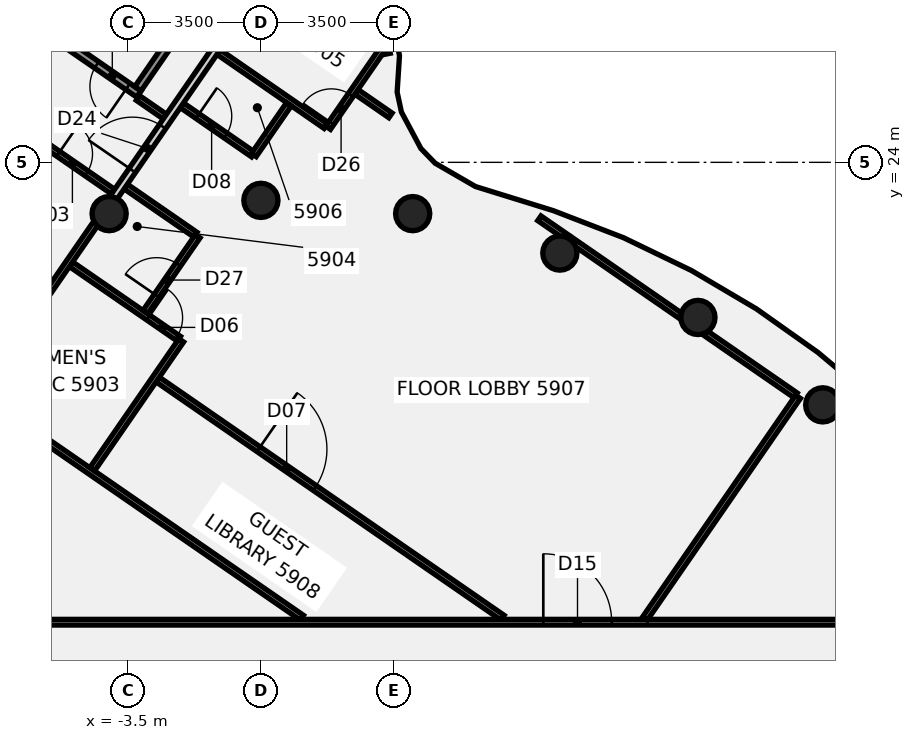
"""IFC4 building model, lengths in metres.
Left out: names, types, materials, properties, quantities, classifications, styles, units other than length and angle.
Written with IfcOpenShell. Run it as: python <this file> out.ifc"""

import sys

from ifc_helpers import new_model, si_unit, direction, frame, frame_2d, origin, origin_2d, place, context, subcontext, project, spatial, rectangle, circle, extrude, element, fill, save


model = new_model("IFC4")
c1 = context("Model", 3, precision=1e-05, world=origin(), true_north=direction((0.0, 1.0)))
c2 = subcontext(c1, "Body", "Model", "MODEL_VIEW")
j1 = project(units=[si_unit("LENGTHUNIT", "METRE"), si_unit("PLANEANGLEUNIT", "RADIAN")], contexts=[c1])
p1 = place(None, origin())
s1 = spatial("IfcSite", under=j1, at=p1, CompositionType="ELEMENT")
p2 = place(p1, origin())
s2 = spatial("IfcBuilding", under=s1, at=p2, CompositionType="ELEMENT")
p3 = place(p2, frame((0.0, 0.0, 234.3)))
s3 = spatial("IfcBuildingStorey", under=s2, at=p3, CompositionType="ELEMENT", Elevation=234.3)
for number, where, z_axis, x_axis in (
    (1, (14.784, 17.619, -0.14), (0.0, 0.0, 1.0), (1.0, 0.0, 0.0)),
    (2, (11.5, 19.919, -0.14), (0.0, 0.0, 1.0), (1.0, 0.0, 0.0)),
    (3, (7.866, 21.613, -0.14), (0.0, 0.0, 1.0), (1.0, 0.0, 0.0)),
    (4, (3.994, 22.651, -0.14), (0.0, 0.0, 1.0), (1.0, 0.0, 0.0)),
    (5, (0.0, 23.0, -0.14), (0.0, 0.0, 1.0), (1.0, 0.0, 0.0)),
    (6, (-3.994, 22.651, -0.14), (0.0, 0.0, 1.0), (1.0, 0.0, 0.0)),
):
    element("IfcColumn", number, at=place(p3, frame(where, z_axis=z_axis, x_axis=x_axis)), inside=s3, PredefinedType="COLUMN", context=c2, shape_type="SweptSolid", body=[
        extrude(circle(Radius=0.45, at=origin_2d()), origin(), (0.0, 0.0, 1.0), 3.6),
    ])
p4 = place(p3, frame((-13.505, 22.09, 0.0), z_axis=(0.0, 0.0, 1.0), x_axis=(0.822876963687, -0.568219590152, 0.0)))
e7 = element("IfcWall", 7, at=p4, inside=s3, PredefinedType="PARTITIONING", context=c2, shape_type="SweptSolid", body=[
    extrude(rectangle(XDim=17.723, YDim=0.15, at=frame_2d((8.861, 0.0))), origin(), (0.0, 0.0, 1.0), 2.864),
])
p5 = place(p3, frame((-11.149, 28.24, 0.0), z_axis=(0.0, 0.0, 1.0), x_axis=(0.822911999703, -0.568168848798, 0.0)))
e8 = element("IfcWall", 8, at=p5, inside=s3, PredefinedType="PARTITIONING", context=c2, shape_type="SweptSolid", body=[
    extrude(rectangle(XDim=8.82, YDim=0.15, at=frame_2d((4.41, 0.0))), origin(), (0.0, 0.0, 1.0), 2.864),
])
p6 = place(p5, frame((7.071, 0.0, 0.0)))
e9 = element("IfcOpeningElement", 9, at=p6, cuts=e8, PredefinedType="OPENING", context=c2, shape_type="SweptSolid", body=[
    extrude(rectangle(XDim=0.9, YDim=2.1, at=frame_2d((0.45, 1.05))), frame((0.0, 0.085, 0.0), z_axis=(0.0, -1.0, 0.0), x_axis=(1.0, 0.0, 0.0)), (0.0, 0.0, 1.0), 0.17),
])
p7 = place(p5, frame((0.52, 0.0, 0.0)))
e10 = element("IfcOpeningElement", 10, at=p7, cuts=e8, PredefinedType="OPENING", context=c2, shape_type="SweptSolid", body=[
    extrude(rectangle(XDim=0.9, YDim=2.1, at=frame_2d((0.45, 1.05))), frame((0.0, 0.085, 0.0), z_axis=(0.0, -1.0, 0.0), x_axis=(1.0, 0.0, 0.0)), (0.0, 0.0, 1.0), 0.17),
])
p8 = place(p3, frame((-3.235, 25.693, 0.0), z_axis=(0.0, 0.0, 1.0), x_axis=(0.822947443063, -0.568117510694, 0.0)))
e11 = element("IfcWall", 11, at=p8, inside=s3, PredefinedType="PARTITIONING", context=c2, shape_type="SweptSolid", body=[
    extrude(rectangle(XDim=0.86, YDim=0.15, at=frame_2d((0.43, 0.0))), origin(), (0.0, 0.0, 1.0), 2.864),
])
p9 = place(p3, frame((-4.993, 21.316, 0.0), z_axis=(0.0, 0.0, 1.0), x_axis=(0.823002595966, -0.568037610579, 0.0)))
e12 = element("IfcWall", 12, at=p9, inside=s3, PredefinedType="PARTITIONING", context=c2, shape_type="SweptSolid", body=[
    extrude(rectangle(XDim=3.445, YDim=0.15, at=frame_2d((1.723, 0.0))), origin(), (0.0, 0.0, 1.0), 2.864),
])
p10 = place(p9, frame((2.47, 0.0, 0.0)))
e13 = element("IfcOpeningElement", 13, at=p10, cuts=e12, PredefinedType="OPENING", context=c2, shape_type="SweptSolid", body=[
    extrude(rectangle(XDim=0.9, YDim=2.1, at=frame_2d((0.45, 1.05))), frame((0.0, 0.085, 0.0), z_axis=(0.0, -1.0, 0.0), x_axis=(1.0, 0.0, 0.0)), (0.0, 0.0, 1.0), 0.17),
])
p11 = place(p3, frame((-3.556, 23.362, 0.0), z_axis=(0.0, 0.0, 1.0), x_axis=(0.822823613498, -0.568296842389, 0.0)))
e14 = element("IfcWall", 14, at=p11, inside=s3, PredefinedType="PARTITIONING", context=c2, shape_type="SweptSolid", body=[
    extrude(rectangle(XDim=2.225, YDim=0.15, at=frame_2d((1.113, 0.0))), origin(), (0.0, 0.0, 1.0), 2.864),
])
p12 = place(p3, frame((-2.712, 18.282, 0.0), z_axis=(0.0, 0.0, 1.0), x_axis=(0.822882105938, -0.568212143242, 0.0)))
e15 = element("IfcWall", 15, at=p12, inside=s3, PredefinedType="PARTITIONING", context=c2, shape_type="SweptSolid", body=[
    extrude(rectangle(XDim=11.023, YDim=0.15, at=frame_2d((5.511, 0.0))), origin(), (0.0, 0.0, 1.0), 2.864),
])
p13 = place(p12, frame((3.22, 0.0, 0.0)))
e16 = element("IfcOpeningElement", 16, at=p13, cuts=e15, PredefinedType="OPENING", context=c2, shape_type="SweptSolid", body=[
    extrude(rectangle(XDim=1.8, YDim=2.1, at=frame_2d((0.9, 1.05))), frame((0.0, 0.085, 0.0), z_axis=(0.0, -1.0, 0.0), x_axis=(1.0, 0.0, 0.0)), (0.0, 0.0, 1.0), 0.17),
])
p14 = place(p3, frame((-2.079, 25.501, 0.0), z_axis=(0.0, 0.0, 1.0), x_axis=(0.822812265146, -0.568313273051, 0.0)))
e17 = element("IfcWall", 17, at=p14, inside=s3, PredefinedType="PARTITIONING", context=c2, shape_type="SweptSolid", body=[
    extrude(rectangle(XDim=2.28, YDim=0.15, at=frame_2d((1.14, 0.0))), origin(), (0.0, 0.0, 1.0), 2.864),
])
p15 = place(p14, frame((0.5, 0.0, 0.0)))
e18 = element("IfcOpeningElement", 18, at=p15, cuts=e17, PredefinedType="OPENING", context=c2, shape_type="SweptSolid", body=[
    extrude(rectangle(XDim=0.9, YDim=2.1, at=frame_2d((0.45, 1.05))), frame((0.0, 0.085, 0.0), z_axis=(0.0, -1.0, 0.0), x_axis=(1.0, 0.0, 0.0)), (0.0, 0.0, 1.0), 0.17),
])
p16 = place(p3, frame((-1.113, 26.9, 0.0), z_axis=(0.0, 0.0, 1.0), x_axis=(0.822835791023, -0.568279210434, 0.0)))
e19 = element("IfcWall", 19, at=p16, inside=s3, PredefinedType="PARTITIONING", context=c2, shape_type="SweptSolid", body=[
    extrude(rectangle(XDim=3.425, YDim=0.15, at=frame_2d((1.712, 0.0))), origin(), (0.0, 0.0, 1.0), 2.864),
])
p17 = place(p3, frame((2.515, 25.854, 0.0), z_axis=(0.0, 0.0, 1.0), x_axis=(0.82271698024, -0.568451203205, 0.0)))
e20 = element("IfcWall", 20, at=p17, inside=s3, PredefinedType="PARTITIONING", context=c2, shape_type="SweptSolid", body=[
    extrude(rectangle(XDim=1.088, YDim=0.15, at=frame_2d((0.544, 0.0))), origin(), (0.0, 0.0, 1.0), 2.864),
])
p18 = place(p3, frame((7.327, 22.528, 0.0), z_axis=(0.0, 0.0, 1.0), x_axis=(0.822772158808, -0.568371335211, 0.0)))
e21 = element("IfcWall", 21, at=p18, inside=s3, PredefinedType="PARTITIONING", context=c2, shape_type="SweptSolid", body=[
    extrude(rectangle(XDim=0.894, YDim=0.15, at=frame_2d((0.447, 0.0))), origin(), (0.0, 0.0, 1.0), 2.864),
])
p19 = place(p3, frame((8.143, 21.965, 0.0), z_axis=(0.0, 0.0, 1.0), x_axis=(0.822719175058, -0.56844802664, 0.0)))
e22 = element("IfcWall", 22, at=p19, inside=s3, PredefinedType="PARTITIONING", context=c2, shape_type="SweptSolid", body=[
    extrude(rectangle(XDim=3.533, YDim=0.15, at=frame_2d((1.767, 0.0))), origin(), (0.0, 0.0, 1.0), 2.864),
])
p20 = place(p3, frame((11.695, 19.511, 0.0), z_axis=(0.0, 0.0, 1.0), x_axis=(0.822712363529, -0.568457884893, 0.0)))
e23 = element("IfcWall", 23, at=p20, inside=s3, PredefinedType="PARTITIONING", context=c2, shape_type="SweptSolid", body=[
    extrude(rectangle(XDim=2.887, YDim=0.15, at=frame_2d((1.444, 0.0))), origin(), (0.0, 0.0, 1.0), 2.864),
])
p21 = place(p3, frame((-17.065, 11.9, 0.0), z_axis=(0.0, 0.0, 1.0), x_axis=(1.0, 0.0, 0.0)))
e24 = element("IfcWall", 24, at=p21, inside=s3, PredefinedType="PARTITIONING", context=c2, shape_type="SweptSolid", body=[
    extrude(rectangle(XDim=34.165, YDim=0.15, at=frame_2d((17.083, 0.0))), origin(), (0.0, 0.0, 1.0), 2.864),
])
p22 = place(p21, frame((24.496, 0.0, 0.0)))
e25 = element("IfcOpeningElement", 25, at=p22, cuts=e24, PredefinedType="OPENING", context=c2, shape_type="SweptSolid", body=[
    extrude(rectangle(XDim=1.8, YDim=2.1, at=frame_2d((0.9, 1.05))), frame((0.0, 0.085, 0.0), z_axis=(0.0, -1.0, 0.0), x_axis=(1.0, 0.0, 0.0)), (0.0, 0.0, 1.0), 0.17),
])
p23 = place(p21, frame((9.52, 0.0, 0.0)))
e26 = element("IfcOpeningElement", 26, at=p23, cuts=e24, PredefinedType="OPENING", context=c2, shape_type="SweptSolid", body=[
    extrude(rectangle(XDim=1.8, YDim=2.1, at=frame_2d((0.9, 1.05))), frame((0.0, 0.085, 0.0), z_axis=(0.0, -1.0, 0.0), x_axis=(1.0, 0.0, 0.0)), (0.0, 0.0, 1.0), 0.17),
])
p24 = place(p21, frame((2.62, 0.0, 0.0)))
e27 = element("IfcOpeningElement", 27, at=p24, cuts=e24, PredefinedType="OPENING", context=c2, shape_type="SweptSolid", body=[
    extrude(rectangle(XDim=1.8, YDim=2.1, at=frame_2d((0.9, 1.05))), frame((0.0, 0.085, 0.0), z_axis=(0.0, -1.0, 0.0), x_axis=(1.0, 0.0, 0.0)), (0.0, 0.0, 1.0), 0.17),
])
p25 = place(p3, frame((-7.399, 17.971, 0.0), z_axis=(0.0, 0.0, 1.0), x_axis=(0.568117777374, 0.822947258961, 0.0)))
e28 = element("IfcWall", 28, at=p25, inside=s3, PredefinedType="PARTITIONING", context=c2, shape_type="SweptSolid", body=[
    extrude(rectangle(XDim=5.559, YDim=0.15, at=frame_2d((2.779, 0.0))), origin(), (0.0, 0.0, 1.0), 2.864),
])
p26 = place(p3, frame((-3.986, 22.915, 0.0), z_axis=(0.0, 0.0, 1.0), x_axis=(0.568137981327, 0.822933310891, 0.0)))
e29 = element("IfcWall", 29, at=p26, inside=s3, PredefinedType="PARTITIONING", context=c2, shape_type="SweptSolid", body=[
    extrude(rectangle(XDim=8.211, YDim=0.2, at=frame_2d((4.105, 0.0))), origin(), (0.0, 0.0, 1.0), 2.864),
])
p27 = place(p26, frame((1.062, 0.0, 0.0)))
e30 = element("IfcOpeningElement", 30, at=p27, cuts=e29, PredefinedType="OPENING", context=c2, shape_type="SweptSolid", body=[
    extrude(rectangle(XDim=1.4, YDim=2.1, at=frame_2d((0.7, 1.05))), frame((0.0, 0.11, 0.0), z_axis=(0.0, -1.0, 0.0), x_axis=(1.0, 0.0, 0.0)), (0.0, 0.0, 1.0), 0.22),
])
p28 = place(p3, frame((-4.438, 15.926, 0.0), z_axis=(0.0, 0.0, 1.0), x_axis=(0.568380820639, 0.82276560619, 0.0)))
e31 = element("IfcWall", 31, at=p28, inside=s3, PredefinedType="PARTITIONING", context=c2, shape_type="SweptSolid", body=[
    extrude(rectangle(XDim=4.12, YDim=0.15, at=frame_2d((2.06, 0.0))), origin(), (0.0, 0.0, 1.0), 2.864),
])
p29 = place(p3, frame((1.769, 24.91, 0.0), z_axis=(0.0, 0.0, 1.0), x_axis=(0.568435463035, 0.82272785559, 0.0)))
e32 = element("IfcWall", 32, at=p29, inside=s3, PredefinedType="PARTITIONING", context=c2, shape_type="SweptSolid", body=[
    extrude(rectangle(XDim=2.509, YDim=0.15, at=frame_2d((1.254, 0.0))), origin(), (0.0, 0.0, 1.0), 2.864),
])
p30 = place(p29, frame((0.15, 0.0, 0.0)))
e33 = element("IfcOpeningElement", 33, at=p30, cuts=e32, PredefinedType="OPENING", context=c2, shape_type="SweptSolid", body=[
    extrude(rectangle(XDim=0.9, YDim=2.1, at=frame_2d((0.45, 1.05))), frame((0.0, 0.085, 0.0), z_axis=(0.0, -1.0, 0.0), x_axis=(1.0, 0.0, 0.0)), (0.0, 0.0, 1.0), 0.17),
])
p31 = place(p3, frame((-3.039, 20.064, 0.0), z_axis=(0.0, 0.0, 1.0), x_axis=(0.568359858761, 0.822780086627, 0.0)))
e34 = element("IfcWall", 34, at=p31, inside=s3, PredefinedType="PARTITIONING", context=c2, shape_type="SweptSolid", body=[
    extrude(rectangle(XDim=2.42, YDim=0.15, at=frame_2d((1.21, 0.0))), origin(), (0.0, 0.0, 1.0), 2.864),
])
p32 = place(p31, frame((0.52, 0.0, 0.0)))
e35 = element("IfcOpeningElement", 35, at=p32, cuts=e34, PredefinedType="OPENING", context=c2, shape_type="SweptSolid", body=[
    extrude(rectangle(XDim=1.0, YDim=2.1, at=frame_2d((0.5, 1.05))), frame((0.0, 0.085, 0.0), z_axis=(0.0, -1.0, 0.0), x_axis=(1.0, 0.0, 0.0)), (0.0, 0.0, 1.0), 0.17),
])
p33 = place(p3, frame((-0.186, 24.194, 0.0), z_axis=(0.0, 0.0, 1.0), x_axis=(0.568394779045, 0.822755963305, 0.0)))
e36 = element("IfcWall", 36, at=p33, inside=s3, PredefinedType="PARTITIONING", context=c2, shape_type="SweptSolid", body=[
    extrude(rectangle(XDim=1.62, YDim=0.15, at=frame_2d((0.81, 0.0))), origin(), (0.0, 0.0, 1.0), 2.864),
])
p34 = place(p3, frame((10.107, 11.999, 0.0), z_axis=(0.0, 0.0, 1.0), x_axis=(0.568236818538, 0.822865066738, 0.0)))
e37 = element("IfcWall", 37, at=p34, inside=s3, PredefinedType="PARTITIONING", context=c2, shape_type="SweptSolid", body=[
    extrude(rectangle(XDim=7.087, YDim=0.15, at=frame_2d((3.543, 0.0))), origin(), (0.0, 0.0, 1.0), 2.864),
])
p35 = place(p3, frame((3.331, 26.856, 0.0), z_axis=(0.0, 0.0, 1.0), x_axis=(-0.191418572588, 0.981508497196, 0.0)))
e38 = element("IfcWall", 38, at=p35, inside=s3, PredefinedType="PARTITIONING", context=c2, shape_type="SweptSolid", body=[
    extrude(rectangle(XDim=0.5, YDim=0.15, at=frame_2d((0.25, 0.0))), origin(), (0.0, 0.0, 1.0), 2.864),
])
p36 = place(p3, frame((-3.211, 25.797, -0.14), z_axis=(0.0, 0.0, 1.0), x_axis=(-0.822880268837, 0.568214803713, 0.0)))
e39 = element("IfcWall", 39, at=p36, inside=s3, PredefinedType="SHEAR", context=c2, shape_type="SweptSolid", body=[
    extrude(rectangle(XDim=6.7, YDim=0.2, at=frame_2d((3.35, 0.0))), origin(), (0.0, 0.0, 1.0), 3.004),
])
p37 = place(p36, frame((0.35, 0.0, 0.0)))
e40 = element("IfcOpeningElement", 40, at=p37, cuts=e39, PredefinedType="OPENING", context=c2, shape_type="SweptSolid", body=[
    extrude(rectangle(XDim=1.0, YDim=2.1, at=frame_2d((0.5, 1.05))), frame((0.0, 0.11, 0.0), z_axis=(0.0, -1.0, 0.0), x_axis=(1.0, 0.0, 0.0)), (0.0, 0.0, 1.0), 0.22),
])
p38 = place(p3, frame((-1.418, 28.57, -0.14), z_axis=(0.0, 0.0, 1.0), x_axis=(-0.568166115105, -0.822913887139, 0.0)))
e41 = element("IfcWall", 41, at=p38, inside=s3, PredefinedType="SHEAR", context=c2, shape_type="SweptSolid", body=[
    extrude(rectangle(XDim=3.2, YDim=0.2, at=frame_2d((1.6, 0.0))), origin(), (0.0, 0.0, 1.0), 3.6),
])
p39 = place(p6, frame((0.9, 0.0, 0.0), z_axis=(0.0, 0.0, 1.0), x_axis=(-1.0, 0.0, 0.0)))
e42 = element("IfcDoor", 42, at=p39, inside=s3, OperationType="SINGLE_SWING_RIGHT", PredefinedType="DOOR", context=c2, shape_type="SweptSolid", body=[
    extrude(rectangle(XDim=0.9, YDim=2.1, at=frame_2d((0.45, 1.05))), frame((0.0, 0.025, 0.0), z_axis=(0.0, -1.0, 0.0), x_axis=(1.0, 0.0, 0.0)), (0.0, 0.0, 1.0), 0.05),
])
fill(e9, e42)
p40 = place(p10, frame((0.9, 0.0, 0.0), z_axis=(0.0, 0.0, 1.0), x_axis=(-1.0, 0.0, 0.0)))
e43 = element("IfcDoor", 43, at=p40, inside=s3, OperationType="SINGLE_SWING_RIGHT", PredefinedType="DOOR", context=c2, shape_type="SweptSolid", body=[
    extrude(rectangle(XDim=0.9, YDim=2.1, at=frame_2d((0.45, 1.05))), frame((0.0, 0.025, 0.0), z_axis=(0.0, -1.0, 0.0), x_axis=(1.0, 0.0, 0.0)), (0.0, 0.0, 1.0), 0.05),
])
fill(e13, e43)
p41 = place(p13, frame((1.8, 0.0, 0.0), z_axis=(0.0, 0.0, 1.0), x_axis=(-1.0, 0.0, 0.0)))
e44 = element("IfcDoor", 44, at=p41, inside=s3, OperationType="DOUBLE_DOOR_SINGLE_SWING", PredefinedType="DOOR", context=c2, shape_type="SweptSolid", body=[
    extrude(rectangle(XDim=1.8, YDim=2.1, at=frame_2d((0.9, 1.05))), frame((0.0, 0.025, 0.0), z_axis=(0.0, -1.0, 0.0), x_axis=(1.0, 0.0, 0.0)), (0.0, 0.0, 1.0), 0.05),
])
fill(e16, e44)
p42 = place(p15, origin())
e45 = element("IfcDoor", 45, at=p42, inside=s3, OperationType="SINGLE_SWING_RIGHT", PredefinedType="DOOR", context=c2, shape_type="SweptSolid", body=[
    extrude(rectangle(XDim=0.9, YDim=2.1, at=frame_2d((0.45, 1.05))), frame((0.0, 0.025, 0.0), z_axis=(0.0, -1.0, 0.0), x_axis=(1.0, 0.0, 0.0)), (0.0, 0.0, 1.0), 0.05),
])
fill(e18, e45)
p43 = place(p22, frame((1.8, 0.0, 0.0), z_axis=(0.0, 0.0, 1.0), x_axis=(-1.0, 0.0, 0.0)))
e46 = element("IfcDoor", 46, at=p43, inside=s3, OperationType="DOUBLE_DOOR_SINGLE_SWING", PredefinedType="DOOR", context=c2, shape_type="SweptSolid", body=[
    extrude(rectangle(XDim=1.8, YDim=2.1, at=frame_2d((0.9, 1.05))), frame((0.0, 0.025, 0.0), z_axis=(0.0, -1.0, 0.0), x_axis=(1.0, 0.0, 0.0)), (0.0, 0.0, 1.0), 0.05),
])
fill(e25, e46)
p44 = place(p27, frame((1.4, 0.0, 0.0), z_axis=(0.0, 0.0, 1.0), x_axis=(-1.0, 0.0, 0.0)))
e47 = element("IfcDoor", 47, at=p44, inside=s3, OperationType="DOUBLE_DOOR_SINGLE_SWING", PredefinedType="DOOR", context=c2, shape_type="SweptSolid", body=[
    extrude(rectangle(XDim=1.4, YDim=2.1, at=frame_2d((0.7, 1.05))), frame((0.0, 0.025, 0.0), z_axis=(0.0, -1.0, 0.0), x_axis=(1.0, 0.0, 0.0)), (0.0, 0.0, 1.0), 0.05),
])
fill(e30, e47)
p45 = place(p30, origin())
e48 = element("IfcDoor", 48, at=p45, inside=s3, OperationType="SINGLE_SWING_RIGHT", PredefinedType="DOOR", context=c2, shape_type="SweptSolid", body=[
    extrude(rectangle(XDim=0.9, YDim=2.1, at=frame_2d((0.45, 1.05))), frame((0.0, 0.025, 0.0), z_axis=(0.0, -1.0, 0.0), x_axis=(1.0, 0.0, 0.0)), (0.0, 0.0, 1.0), 0.05),
])
fill(e33, e48)
p46 = place(p32, origin())
e49 = element("IfcDoor", 49, at=p46, inside=s3, OperationType="SINGLE_SWING_RIGHT", PredefinedType="DOOR", context=c2, shape_type="SweptSolid", body=[
    extrude(rectangle(XDim=1.0, YDim=2.1, at=frame_2d((0.5, 1.05))), frame((0.0, 0.025, 0.0), z_axis=(0.0, -1.0, 0.0), x_axis=(1.0, 0.0, 0.0)), (0.0, 0.0, 1.0), 0.05),
])
fill(e35, e49)
p47 = place(p37, origin())
e50 = element("IfcDoor", 50, at=p47, inside=s3, OperationType="SINGLE_SWING_LEFT", PredefinedType="DOOR", context=c2, shape_type="SweptSolid", body=[
    extrude(rectangle(XDim=1.0, YDim=2.1, at=frame_2d((0.5, 1.05))), frame((0.0, 0.025, 0.0), z_axis=(0.0, -1.0, 0.0), x_axis=(1.0, 0.0, 0.0)), (0.0, 0.0, 1.0), 0.05),
])
fill(e40, e50)
save(model, sys.argv[1])
